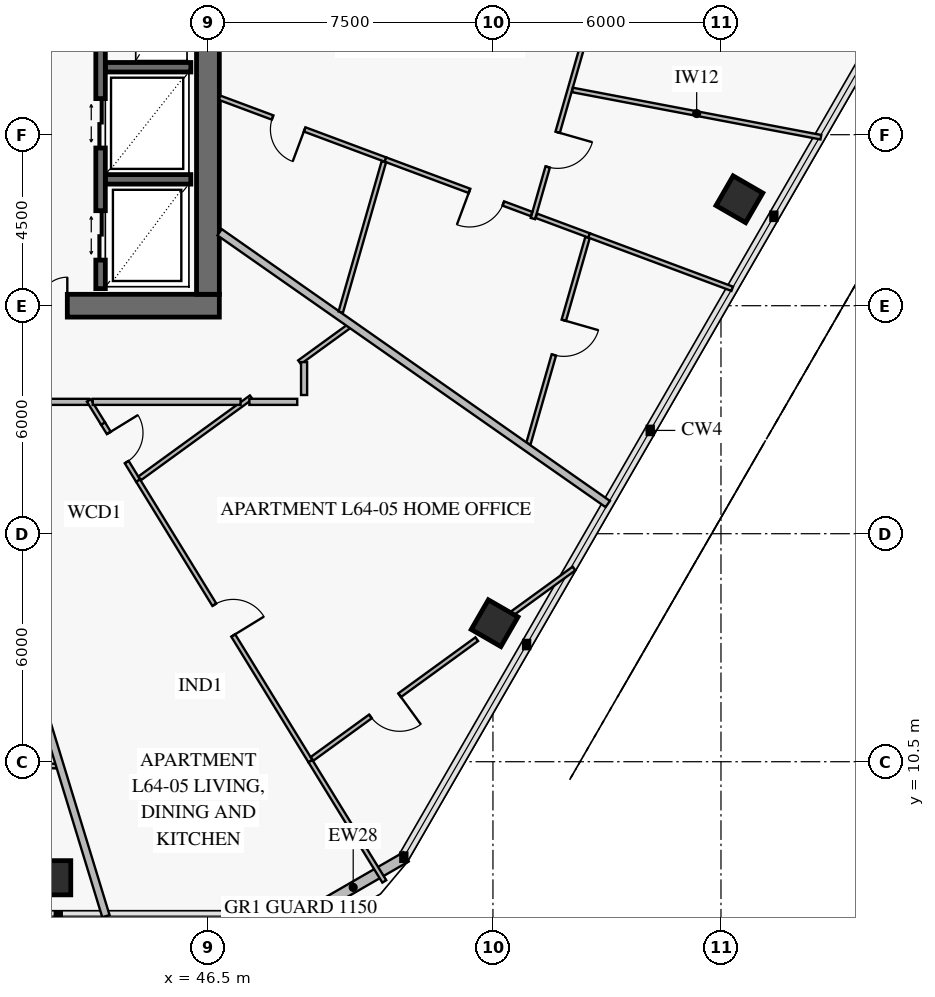
"""IFC4 building model, lengths in metres.
Left out: names, types, materials, properties, quantities, classifications, styles, units other than length and angle.
Written with IfcOpenShell. Run it as: python <this file> out.ifc"""

import sys

from ifc_helpers import new_model, si_unit, direction, frame, frame_2d, origin, origin_2d, place, context, subcontext, project, spatial, rectangle, extrude, element, fill, save


model = new_model("IFC4")
c1 = context("Model", 3, precision=1e-05, world=origin(), true_north=direction((0.0, 1.0)))
c2 = subcontext(c1, "Body", "Model", "MODEL_VIEW")
j1 = project(units=[si_unit("LENGTHUNIT", "METRE"), si_unit("PLANEANGLEUNIT", "RADIAN")], contexts=[c1])
p1 = place(None, origin())
s1 = spatial("IfcSite", under=j1, at=p1, CompositionType="ELEMENT")
p2 = place(p1, origin())
s2 = spatial("IfcBuilding", under=s1, at=p2, CompositionType="ELEMENT")
p3 = place(p2, frame((0.0, 0.0, 254.0)))
s3 = spatial("IfcBuildingStorey", under=s2, at=p3, CompositionType="ELEMENT", Elevation=254.0)
p4 = place(p3, frame((37.35, 22.5, 0.0), z_axis=(0.0, 0.0, 1.0), x_axis=(1.0, 0.0, 0.0)))
e1 = element("IfcWall", 1, at=p4, inside=s3, PredefinedType="SHEAR", context=c2, shape_type="SweptSolid", body=[
    extrude(rectangle(XDim=9.45, YDim=0.6, at=frame_2d((4.725, 0.0))), origin(), (0.0, 0.0, 1.0), 3.8),
])
p5 = place(p4, frame((3.95, 0.0, 0.0)))
e2 = element("IfcOpeningElement", 2, at=p5, cuts=e1, PredefinedType="OPENING", context=c2, shape_type="SweptSolid", body=[
    extrude(rectangle(XDim=1.5, YDim=2.15, at=frame_2d((0.75, 1.075))), frame((0.0, 0.312, 0.0), z_axis=(0.0, -1.0, 0.0), x_axis=(1.0, 0.0, 0.0)), (0.0, 0.0, 1.0), 0.624),
])
p6 = place(p3, frame((46.5, 22.8, 0.0), z_axis=(0.0, 0.0, 1.0), x_axis=(0.0, 1.0, 0.0)))
e3 = element("IfcWall", 3, at=p6, inside=s3, PredefinedType="SHEAR", context=c2, shape_type="SweptSolid", body=[
    extrude(rectangle(XDim=18.4, YDim=0.6, at=frame_2d((9.2, 0.0))), origin(), (0.0, 0.0, 1.0), 3.8),
])
p7 = place(p6, frame((8.95, 0.0, 0.0)))
e4 = element("IfcOpeningElement", 4, at=p7, cuts=e3, PredefinedType="OPENING", context=c2, shape_type="SweptSolid", body=[
    extrude(rectangle(XDim=1.1, YDim=2.15, at=frame_2d((0.55, 1.075))), frame((0.0, 0.312, 0.0), z_axis=(0.0, -1.0, 0.0), x_axis=(1.0, 0.0, 0.0)), (0.0, 0.0, 1.0), 0.624),
])
for number, where, z_axis, x_axis in (
    (5, (42.441, 7.446, 0.0), (0.0, 0.0, 1.0), (1.0, 0.0, 0.0)),
    (6, (54.044, 14.145, 0.0), (0.0, 0.0, 1.0), (0.5, 0.866, 0.0)),
    (7, (60.485, 25.301, 0.0), (0.0, 0.0, 1.0), (0.5, 0.866, 0.0)),
):
    element("IfcColumn", number, at=place(p3, frame(where, z_axis=z_axis, x_axis=x_axis)), inside=s3, PredefinedType="COLUMN", context=c2, shape_type="SweptSolid", body=[
        extrude(rectangle(XDim=0.9, YDim=0.9, at=origin_2d()), origin(), (0.0, 0.0, 1.0), 3.55),
    ])
p8 = place(p3, frame((51.715, 7.996, 0.0), z_axis=(0.0, 0.0, 1.0), x_axis=(-0.866028773314, -0.499994163758, 0.0)))
e8 = element("IfcWall", 8, at=p8, inside=s3, PredefinedType="SOLIDWALL", context=c2, shape_type="SweptSolid", body=[
    extrude(rectangle(XDim=3.215, YDim=0.28, at=frame_2d((1.607, 0.0))), origin(), (0.0, 0.0, 1.0), 3.55),
])
for number, where, z_axis, x_axis in (
    (9, (43.8, 25.825, 0.0), (0.0, 0.0, 1.0), (1.0, 0.0, 0.0)),
    (10, (43.8, 28.775, 0.0), (0.0, 0.0, 1.0), (1.0, 0.0, 0.0)),
):
    element("IfcWall", number, at=place(p3, frame(where, z_axis=z_axis, x_axis=x_axis)), inside=s3, PredefinedType="SOLIDWALL", context=c2, shape_type="SweptSolid", body=[
        extrude(rectangle(XDim=2.25, YDim=0.25, at=frame_2d((1.125, 0.0))), origin(), (0.0, 0.0, 1.0), 3.8),
    ])
p9 = place(p3, frame((43.675, 22.95, 0.0), z_axis=(0.0, 0.0, 1.0), x_axis=(0.0, 1.0, 0.0)))
e11 = element("IfcWall", 11, at=p9, inside=s3, PredefinedType="SOLIDWALL", context=c2, shape_type="SweptSolid", body=[
    extrude(rectangle(XDim=8.2, YDim=0.25, at=frame_2d((4.1, 0.0))), origin(), (0.0, 0.0, 1.0), 3.8),
])
p10 = place(p9, frame((0.75, 0.0, 0.0)))
e12 = element("IfcOpeningElement", 12, at=p10, cuts=e11, PredefinedType="OPENING", context=c2, shape_type="SweptSolid", body=[
    extrude(rectangle(XDim=1.3, YDim=2.3, at=frame_2d((0.65, 1.15))), frame((0.0, 0.137, 0.0), z_axis=(0.0, -1.0, 0.0), x_axis=(1.0, 0.0, 0.0)), (0.0, 0.0, 1.0), 0.274),
])
p11 = place(p9, frame((3.7, 0.0, 0.0)))
e13 = element("IfcOpeningElement", 13, at=p11, cuts=e11, PredefinedType="OPENING", context=c2, shape_type="SweptSolid", body=[
    extrude(rectangle(XDim=1.3, YDim=2.3, at=frame_2d((0.65, 1.15))), frame((0.0, 0.137, 0.0), z_axis=(0.0, -1.0, 0.0), x_axis=(1.0, 0.0, 0.0)), (0.0, 0.0, 1.0), 0.274),
])
p12 = place(p9, frame((6.62, 0.0, 0.0)))
e14 = element("IfcOpeningElement", 14, at=p12, cuts=e11, PredefinedType="OPENING", context=c2, shape_type="SweptSolid", body=[
    extrude(rectangle(XDim=0.9, YDim=2.1, at=frame_2d((0.45, 1.05))), frame((0.0, 0.137, 0.0), z_axis=(0.0, -1.0, 0.0), x_axis=(1.0, 0.0, 0.0)), (0.0, 0.0, 1.0), 0.274),
])
p13 = place(p3, frame((33.051, 10.879, 0.0), z_axis=(0.0, 0.0, 1.0), x_axis=(0.998629555411, -0.052335562088, 0.0)))
e15 = element("IfcWall", 15, at=p13, inside=s3, PredefinedType="PARTITIONING", context=c2, shape_type="SweptSolid", body=[
    extrude(rectangle(XDim=9.47, YDim=0.12, at=frame_2d((4.735, 0.0))), origin(), (0.0, 0.0, 1.0), 2.95),
])
p14 = place(p13, frame((1.948, 0.0, 0.0)))
e16 = element("IfcOpeningElement", 16, at=p14, cuts=e15, PredefinedType="OPENING", context=c2, shape_type="SweptSolid", body=[
    extrude(rectangle(XDim=0.95, YDim=2.1, at=frame_2d((0.475, 1.05))), frame((0.0, 0.072, 0.0), z_axis=(0.0, -1.0, 0.0), x_axis=(1.0, 0.0, 0.0)), (0.0, 0.0, 1.0), 0.144),
])
p15 = place(p13, frame((6.441, 0.0, 0.0)))
e17 = element("IfcOpeningElement", 17, at=p15, cuts=e15, PredefinedType="OPENING", context=c2, shape_type="SweptSolid", body=[
    extrude(rectangle(XDim=0.95, YDim=2.1, at=frame_2d((0.475, 1.05))), frame((0.0, 0.072, 0.0), z_axis=(0.0, -1.0, 0.0), x_axis=(1.0, 0.0, 0.0)), (0.0, 0.0, 1.0), 0.144),
])
p16 = place(p3, frame((43.74, 19.4, 0.0), z_axis=(0.0, 0.0, 1.0), x_axis=(0.523441067702, -0.852061880759, 0.0)))
e18 = element("IfcWall", 18, at=p16, inside=s3, PredefinedType="PARTITIONING", context=c2, shape_type="SweptSolid", body=[
    extrude(rectangle(XDim=1.764, YDim=0.12, at=frame_2d((0.882, 0.0))), origin(), (0.0, 0.0, 1.0), 3.55),
])
p17 = place(p16, frame((0.291, 0.0, 0.0)))
e19 = element("IfcOpeningElement", 19, at=p17, cuts=e18, PredefinedType="OPENING", context=c2, shape_type="SweptSolid", body=[
    extrude(rectangle(XDim=0.9, YDim=2.1, at=frame_2d((0.45, 1.05))), frame((0.0, 0.072, 0.0), z_axis=(0.0, -1.0, 0.0), x_axis=(1.0, 0.0, 0.0)), (0.0, 0.0, 1.0), 0.144),
])
p18 = place(p3, frame((44.663, 17.896, 0.0), z_axis=(0.0, 0.0, 1.0), x_axis=(0.523381863005, -0.852098248723, 0.0)))
e20 = element("IfcWall", 20, at=p18, inside=s3, PredefinedType="PARTITIONING", context=c2, shape_type="SweptSolid", body=[
    extrude(rectangle(XDim=8.664, YDim=0.12, at=frame_2d((4.332, 0.0))), origin(), (0.0, 0.0, 1.0), 2.93),
])
p19 = place(p18, frame((3.832, 0.0, 0.0)))
e21 = element("IfcOpeningElement", 21, at=p19, cuts=e20, PredefinedType="OPENING", context=c2, shape_type="SweptSolid", body=[
    extrude(rectangle(XDim=0.95, YDim=2.1, at=frame_2d((0.475, 1.05))), frame((0.0, 0.072, 0.0), z_axis=(0.0, -1.0, 0.0), x_axis=(1.0, 0.0, 0.0)), (0.0, 0.0, 1.0), 0.144),
])
p20 = place(p3, frame((49.24, 10.575, 0.0), z_axis=(0.0, 0.0, 1.0), x_axis=(0.809007956484, 0.587797691681, 0.0)))
e22 = element("IfcWall", 22, at=p20, inside=s3, PredefinedType="PARTITIONING", context=c2, shape_type="SweptSolid", body=[
    extrude(rectangle(XDim=5.357, YDim=0.12, at=frame_2d((2.679, 0.0))), origin(), (0.0, 0.0, 1.0), 2.93),
])
p21 = place(p20, frame((1.899, 0.0, 0.0)))
e23 = element("IfcOpeningElement", 23, at=p21, cuts=e22, PredefinedType="OPENING", context=c2, shape_type="SweptSolid", body=[
    extrude(rectangle(XDim=0.95, YDim=2.1, at=frame_2d((0.475, 1.05))), frame((0.0, 0.072, 0.0), z_axis=(0.0, -1.0, 0.0), x_axis=(1.0, 0.0, 0.0)), (0.0, 0.0, 1.0), 0.144),
])
p22 = place(p3, frame((39.814, 19.97, 0.0), z_axis=(0.0, 0.0, 1.0), x_axis=(1.0, 0.0, 0.0)))
e24 = element("IfcWall", 24, at=p22, inside=s3, PredefinedType="PARTITIONING", context=c2, shape_type="SweptSolid", body=[
    extrude(rectangle(XDim=3.552, YDim=0.16, at=frame_2d((1.776, 0.0))), origin(), (0.0, 0.0, 1.0), 3.55),
])
p23 = place(p22, frame((1.251, 0.0, 0.0)))
e25 = element("IfcOpeningElement", 25, at=p23, cuts=e24, PredefinedType="OPENING", context=c2, shape_type="SweptSolid", body=[
    extrude(rectangle(XDim=1.05, YDim=2.15, at=frame_2d((0.525, 1.075))), frame((0.0, 0.092, 0.0), z_axis=(0.0, -1.0, 0.0), x_axis=(1.0, 0.0, 0.0)), (0.0, 0.0, 1.0), 0.184),
])
p24 = place(p3, frame((55.051, 24.793, 0.0), z_axis=(0.0, 0.0, 1.0), x_axis=(0.275631107549, 0.961263487578, 0.0)))
e26 = element("IfcWall", 26, at=p24, inside=s3, PredefinedType="PARTITIONING", context=c2, shape_type="SweptSolid", body=[
    extrude(rectangle(XDim=8.574, YDim=0.12, at=frame_2d((4.287, 0.0))), origin(), (0.0, 0.0, 1.0), 2.95),
])
p25 = place(p24, frame((1.413, 0.0, 0.0)))
e27 = element("IfcOpeningElement", 27, at=p25, cuts=e26, PredefinedType="OPENING", context=c2, shape_type="SweptSolid", body=[
    extrude(rectangle(XDim=0.95, YDim=2.1, at=frame_2d((0.475, 1.05))), frame((0.0, 0.072, 0.0), z_axis=(0.0, -1.0, 0.0), x_axis=(1.0, 0.0, 0.0)), (0.0, 0.0, 1.0), 0.144),
])
p26 = place(p24, frame((5.459, 0.0, 0.0)))
e28 = element("IfcOpeningElement", 28, at=p26, cuts=e26, PredefinedType="OPENING", context=c2, shape_type="SweptSolid", body=[
    extrude(rectangle(XDim=0.95, YDim=2.1, at=frame_2d((0.475, 1.05))), frame((0.0, 0.072, 0.0), z_axis=(0.0, -1.0, 0.0), x_axis=(1.0, 0.0, 0.0)), (0.0, 0.0, 1.0), 0.144),
])
p27 = place(p3, frame((46.808, 27.972, 0.0), z_axis=(0.0, 0.0, 1.0), x_axis=(0.937036038674, -0.349232676344, 0.0)))
e29 = element("IfcWall", 29, at=p27, inside=s3, PredefinedType="PARTITIONING", context=c2, shape_type="SweptSolid", body=[
    extrude(rectangle(XDim=4.657, YDim=0.12, at=frame_2d((2.329, 0.0))), origin(), (0.0, 0.0, 1.0), 3.55),
])
p28 = place(p27, frame((1.487, 0.0, 0.0)))
e30 = element("IfcOpeningElement", 30, at=p28, cuts=e29, PredefinedType="OPENING", context=c2, shape_type="SweptSolid", body=[
    extrude(rectangle(XDim=0.9, YDim=2.1, at=frame_2d((0.45, 1.05))), frame((0.0, 0.072, 0.0), z_axis=(0.0, -1.0, 0.0), x_axis=(1.0, 0.0, 0.0)), (0.0, 0.0, 1.0), 0.144),
])
p29 = place(p3, frame((51.172, 26.345, 0.0), z_axis=(0.0, 0.0, 1.0), x_axis=(0.937041629646, -0.349217674682, 0.0)))
e31 = element("IfcWall", 31, at=p29, inside=s3, PredefinedType="PARTITIONING", context=c2, shape_type="SweptSolid", body=[
    extrude(rectangle(XDim=4.101, YDim=0.12, at=frame_2d((2.051, 0.0))), origin(), (0.0, 0.0, 1.0), 3.15),
])
p30 = place(p29, frame((2.359, 0.0, 0.0)))
e32 = element("IfcOpeningElement", 32, at=p30, cuts=e31, PredefinedType="OPENING", context=c2, shape_type="SweptSolid", body=[
    extrude(rectangle(XDim=0.95, YDim=2.1, at=frame_2d((0.475, 1.05))), frame((0.0, 0.072, 0.0), z_axis=(0.0, -1.0, 0.0), x_axis=(1.0, 0.0, 0.0)), (0.0, 0.0, 1.0), 0.144),
])
p31 = place(p3, frame((55.143, 24.866, 0.0), z_axis=(0.0, 0.0, 1.0), x_axis=(0.937038743308, -0.349225419378, 0.0)))
e33 = element("IfcWall", 33, at=p31, inside=s3, PredefinedType="PARTITIONING", context=c2, shape_type="SweptSolid", body=[
    extrude(rectangle(XDim=1.481, YDim=0.12, at=frame_2d((0.74, 0.0))), origin(), (0.0, 0.0, 1.0), 3.55),
])
p32 = place(p3, frame((54.932, 18.867, 0.0), z_axis=(0.0, 0.0, 1.0), x_axis=(0.275658043462, 0.961255763611, 0.0)))
e34 = element("IfcWall", 34, at=p32, inside=s3, PredefinedType="PARTITIONING", context=c2, shape_type="SweptSolid", body=[
    extrude(rectangle(XDim=5.644, YDim=0.12, at=frame_2d((2.822, 0.0))), origin(), (0.0, 0.0, 1.0), 3.55),
])
p33 = place(p32, frame((2.431, 0.0, 0.0)))
e35 = element("IfcOpeningElement", 35, at=p33, cuts=e34, PredefinedType="OPENING", context=c2, shape_type="SweptSolid", body=[
    extrude(rectangle(XDim=0.95, YDim=2.1, at=frame_2d((0.475, 1.05))), frame((0.0, 0.072, 0.0), z_axis=(0.0, -1.0, 0.0), x_axis=(1.0, 0.0, 0.0)), (0.0, 0.0, 1.0), 0.144),
])
p34 = place(p3, frame((39.666, 20.01, 0.0), z_axis=(0.0, 0.0, 1.0), x_axis=(0.292371477774, -0.956304825348, 0.0)))
e36 = element("IfcWall", 36, at=p34, inside=s3, PredefinedType="PARTITIONING", context=c2, shape_type="SweptSolid", body=[
    extrude(rectangle(XDim=14.194, YDim=0.2, at=frame_2d((7.097, 0.0))), origin(), (0.0, 0.0, 1.0), 2.93),
])
p35 = place(p3, frame((43.366, 20.008, 0.0), z_axis=(0.0, 0.0, 1.0), x_axis=(0.52321946428, -0.852197977115, 0.0)))
e37 = element("IfcWall", 37, at=p35, inside=s3, PredefinedType="PARTITIONING", context=c2, shape_type="SweptSolid", body=[
    extrude(rectangle(XDim=0.714, YDim=0.12, at=frame_2d((0.357, 0.0))), origin(), (0.0, 0.0, 1.0), 3.55),
])
p36 = place(p3, frame((49.198, 10.514, 0.0), z_axis=(0.0, 0.0, 1.0), x_axis=(0.523392872286, -0.852091486426, 0.0)))
e38 = element("IfcWall", 38, at=p36, inside=s3, PredefinedType="PARTITIONING", context=c2, shape_type="SweptSolid", body=[
    extrude(rectangle(XDim=3.713, YDim=0.12, at=frame_2d((1.856, 0.0))), origin(), (0.0, 0.0, 1.0), 3.55),
])
p37 = place(p3, frame((44.705, 17.958, 0.0), z_axis=(0.0, 0.0, 1.0), x_axis=(0.809009560969, 0.587795483362, 0.0)))
e39 = element("IfcWall", 39, at=p37, inside=s3, PredefinedType="PARTITIONING", context=c2, shape_type="SweptSolid", body=[
    extrude(rectangle(XDim=3.628, YDim=0.12, at=frame_2d((1.814, 0.0))), origin(), (0.0, 0.0, 1.0), 3.55),
])
p38 = place(p3, frame((48.91, 21.013, 0.0), z_axis=(0.0, 0.0, 1.0), x_axis=(0.809007643974, 0.5877981218, 0.0)))
e40 = element("IfcWall", 40, at=p38, inside=s3, PredefinedType="PARTITIONING", context=c2, shape_type="SweptSolid", body=[
    extrude(rectangle(XDim=1.632, YDim=0.12, at=frame_2d((0.816, 0.0))), origin(), (0.0, 0.0, 1.0), 3.55),
])
p39 = place(p3, frame((54.514, 14.407, 0.0), z_axis=(0.0, 0.0, 1.0), x_axis=(0.809041940598, 0.58775091523, 0.0)))
e41 = element("IfcWall", 41, at=p39, inside=s3, PredefinedType="PARTITIONING", context=c2, shape_type="SweptSolid", body=[
    extrude(rectangle(XDim=2.001, YDim=0.12, at=frame_2d((1.0, 0.0))), origin(), (0.0, 0.0, 1.0), 3.55),
])
p40 = place(p3, frame((46.808, 24.432, 0.0), z_axis=(0.0, 0.0, 1.0), x_axis=(0.819149112162, -0.57358062384, 0.0)))
e42 = element("IfcWall", 42, at=p40, inside=s3, PredefinedType="PARTITIONING", context=c2, shape_type="SweptSolid", body=[
    extrude(rectangle(XDim=12.467, YDim=0.2, at=frame_2d((6.233, 0.0))), origin(), (0.0, 0.0, 1.0), 2.93),
])
p41 = place(p3, frame((56.092, 28.177, 0.0), z_axis=(0.0, 0.0, 1.0), x_axis=(0.982380617182, -0.18689120628, 0.0)))
e43 = element("IfcWall", 43, at=p41, inside=s3, PredefinedType="PARTITIONING", context=c2, shape_type="SweptSolid", body=[
    extrude(rectangle(XDim=6.653, YDim=0.12, at=frame_2d((3.327, 0.0))), origin(), (0.0, 0.0, 1.0), 2.93),
])
p42 = place(p3, frame((56.53, 24.349, 0.0), z_axis=(0.0, 0.0, 1.0), x_axis=(0.937033786593, -0.349238718906, 0.0)))
e44 = element("IfcWall", 44, at=p42, inside=s3, PredefinedType="PARTITIONING", context=c2, shape_type="SweptSolid", body=[
    extrude(rectangle(XDim=4.019, YDim=0.12, at=frame_2d((2.01, 0.0))), origin(), (0.0, 0.0, 1.0), 2.93),
])
p43 = place(p3, frame((49.995, 22.332, 0.0), z_axis=(0.0, 0.0, 1.0), x_axis=(0.27563759031, 0.961261628699, 0.0)))
e45 = element("IfcWall", 45, at=p43, inside=s3, PredefinedType="PARTITIONING", context=c2, shape_type="SweptSolid", body=[
    extrude(rectangle(XDim=4.116, YDim=0.12, at=frame_2d((2.058, 0.0))), origin(), (0.0, 0.0, 1.0), 3.55),
])
p44 = place(p3, frame((43.469, 19.97, 0.0), z_axis=(0.0, 0.0, 1.0), x_axis=(1.0, 0.0, 0.0)))
e46 = element("IfcWall", 46, at=p44, inside=s3, PredefinedType="PARTITIONING", context=c2, shape_type="SweptSolid", body=[
    extrude(rectangle(XDim=3.89, YDim=0.16, at=frame_2d((1.945, 0.0))), origin(), (0.0, 0.0, 1.0), 3.55),
])
p45 = place(p3, frame((47.59, 19.97, 0.0), z_axis=(0.0, 0.0, 1.0), x_axis=(1.0, 0.0, 0.0)))
e47 = element("IfcWall", 47, at=p45, inside=s3, PredefinedType="PARTITIONING", context=c2, shape_type="SweptSolid", body=[
    extrude(rectangle(XDim=1.26, YDim=0.16, at=frame_2d((0.63, 0.0))), origin(), (0.0, 0.0, 1.0), 2.95),
])
p46 = place(p3, frame((49.03, 20.15, 0.0), z_axis=(0.0, 0.0, 1.0), x_axis=(0.0, 1.0, 0.0)))
e48 = element("IfcWall", 48, at=p46, inside=s3, PredefinedType="PARTITIONING", context=c2, shape_type="SweptSolid", body=[
    extrude(rectangle(XDim=0.866, YDim=0.16, at=frame_2d((0.433, 0.0))), origin(), (0.0, 0.0, 1.0), 3.55),
])
p47 = place(p5, origin())
e49 = element("IfcDoor", 49, at=p47, inside=s3, OperationType="DOUBLE_DOOR_SINGLE_SWING", PredefinedType="DOOR", context=c2, shape_type="SweptSolid", body=[
    extrude(rectangle(XDim=1.5, YDim=2.15, at=frame_2d((0.75, 1.075))), frame((0.0, 0.025, 0.0), z_axis=(0.0, -1.0, 0.0), x_axis=(1.0, 0.0, 0.0)), (0.0, 0.0, 1.0), 0.05),
])
fill(e2, e49)
p48 = place(p10, origin())
e50 = element("IfcDoor", 50, at=p48, inside=s3, OperationType="DOUBLE_DOOR_SLIDING", PredefinedType="DOOR", context=c2, shape_type="SweptSolid", body=[
    extrude(rectangle(XDim=1.3, YDim=2.3, at=frame_2d((0.65, 1.15))), frame((0.0, 0.025, 0.0), z_axis=(0.0, -1.0, 0.0), x_axis=(1.0, 0.0, 0.0)), (0.0, 0.0, 1.0), 0.05),
])
fill(e12, e50)
p49 = place(p11, origin())
e51 = element("IfcDoor", 51, at=p49, inside=s3, OperationType="DOUBLE_DOOR_SLIDING", PredefinedType="DOOR", context=c2, shape_type="SweptSolid", body=[
    extrude(rectangle(XDim=1.3, YDim=2.3, at=frame_2d((0.65, 1.15))), frame((0.0, 0.025, 0.0), z_axis=(0.0, -1.0, 0.0), x_axis=(1.0, 0.0, 0.0)), (0.0, 0.0, 1.0), 0.05),
])
fill(e13, e51)
p50 = place(p17, origin())
e52 = element("IfcDoor", 52, at=p50, inside=s3, OperationType="SINGLE_SWING_LEFT", PredefinedType="DOOR", context=c2, shape_type="SweptSolid", body=[
    extrude(rectangle(XDim=0.9, YDim=2.1, at=frame_2d((0.45, 1.05))), frame((0.0, 0.025, 0.0), z_axis=(0.0, -1.0, 0.0), x_axis=(1.0, 0.0, 0.0)), (0.0, 0.0, 1.0), 0.05),
])
fill(e19, e52)
p51 = place(p19, origin())
e53 = element("IfcDoor", 53, at=p51, inside=s3, OperationType="SINGLE_SWING_RIGHT", PredefinedType="DOOR", context=c2, shape_type="SweptSolid", body=[
    extrude(rectangle(XDim=0.95, YDim=2.1, at=frame_2d((0.475, 1.05))), frame((0.0, 0.025, 0.0), z_axis=(0.0, -1.0, 0.0), x_axis=(1.0, 0.0, 0.0)), (0.0, 0.0, 1.0), 0.05),
])
fill(e21, e53)
p52 = place(p21, frame((0.95, 0.0, 0.0), z_axis=(0.0, 0.0, 1.0), x_axis=(-1.0, 0.0, 0.0)))
e54 = element("IfcDoor", 54, at=p52, inside=s3, OperationType="SINGLE_SWING_LEFT", PredefinedType="DOOR", context=c2, shape_type="SweptSolid", body=[
    extrude(rectangle(XDim=0.95, YDim=2.1, at=frame_2d((0.475, 1.05))), frame((0.0, 0.025, 0.0), z_axis=(0.0, -1.0, 0.0), x_axis=(1.0, 0.0, 0.0)), (0.0, 0.0, 1.0), 0.05),
])
fill(e23, e54)
p53 = place(p25, frame((0.95, 0.0, 0.0), z_axis=(0.0, 0.0, 1.0), x_axis=(-1.0, 0.0, 0.0)))
e55 = element("IfcDoor", 55, at=p53, inside=s3, OperationType="SINGLE_SWING_LEFT", PredefinedType="DOOR", context=c2, shape_type="SweptSolid", body=[
    extrude(rectangle(XDim=0.95, YDim=2.1, at=frame_2d((0.475, 1.05))), frame((0.0, 0.025, 0.0), z_axis=(0.0, -1.0, 0.0), x_axis=(1.0, 0.0, 0.0)), (0.0, 0.0, 1.0), 0.05),
])
fill(e27, e55)
p54 = place(p28, frame((0.9, 0.0, 0.0), z_axis=(0.0, 0.0, 1.0), x_axis=(-1.0, 0.0, 0.0)))
e56 = element("IfcDoor", 56, at=p54, inside=s3, OperationType="SINGLE_SWING_LEFT", PredefinedType="DOOR", context=c2, shape_type="SweptSolid", body=[
    extrude(rectangle(XDim=0.9, YDim=2.1, at=frame_2d((0.45, 1.05))), frame((0.0, 0.025, 0.0), z_axis=(0.0, -1.0, 0.0), x_axis=(1.0, 0.0, 0.0)), (0.0, 0.0, 1.0), 0.05),
])
fill(e30, e56)
p55 = place(p30, frame((0.95, 0.0, 0.0), z_axis=(0.0, 0.0, 1.0), x_axis=(-1.0, 0.0, 0.0)))
e57 = element("IfcDoor", 57, at=p55, inside=s3, OperationType="SINGLE_SWING_RIGHT", PredefinedType="DOOR", context=c2, shape_type="SweptSolid", body=[
    extrude(rectangle(XDim=0.95, YDim=2.1, at=frame_2d((0.475, 1.05))), frame((0.0, 0.025, 0.0), z_axis=(0.0, -1.0, 0.0), x_axis=(1.0, 0.0, 0.0)), (0.0, 0.0, 1.0), 0.05),
])
fill(e32, e57)
p56 = place(p33, frame((0.95, 0.0, 0.0), z_axis=(0.0, 0.0, 1.0), x_axis=(-1.0, 0.0, 0.0)))
e58 = element("IfcDoor", 58, at=p56, inside=s3, OperationType="SINGLE_SWING_LEFT", PredefinedType="DOOR", context=c2, shape_type="SweptSolid", body=[
    extrude(rectangle(XDim=0.95, YDim=2.1, at=frame_2d((0.475, 1.05))), frame((0.0, 0.025, 0.0), z_axis=(0.0, -1.0, 0.0), x_axis=(1.0, 0.0, 0.0)), (0.0, 0.0, 1.0), 0.05),
])
fill(e35, e58)
save(model, sys.argv[1])
